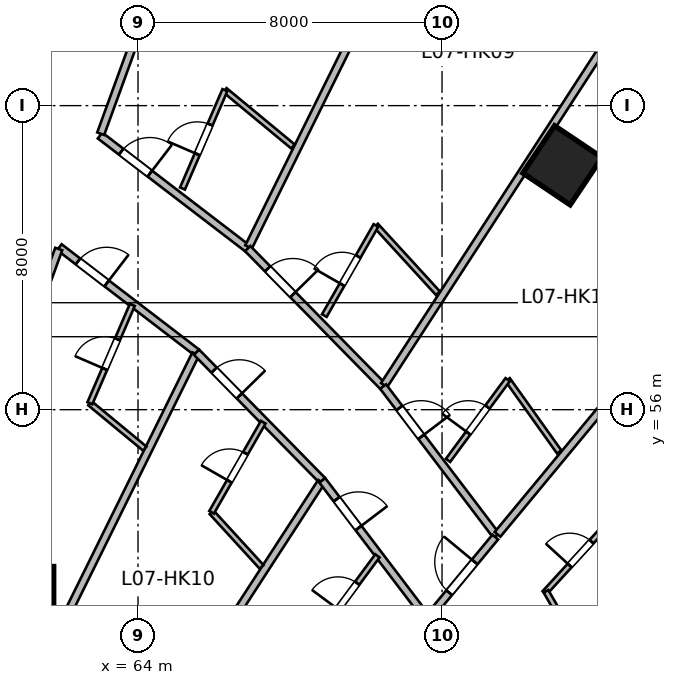
"""IFC4 building model, lengths in metres.
Left out: names, types, materials, properties, quantities, classifications, styles, units other than length and angle.
Written with IfcOpenShell. Run it as: python <this file> out.ifc"""

import sys

from ifc_helpers import new_model, si_unit, direction, frame, frame_2d, origin, origin_2d, place, context, subcontext, project, spatial, rectangle, circle, extrude, source, transform, mapped, element, fill, save


model = new_model("IFC4")
c1 = context("Model", 3, precision=1e-05, world=origin(), true_north=direction((0.0, 1.0)))
c2 = subcontext(c1, "Body", "Model", "MODEL_VIEW")
j1 = project(units=[si_unit("LENGTHUNIT", "METRE"), si_unit("PLANEANGLEUNIT", "RADIAN")], contexts=[c1])
p1 = place(None, origin())
s1 = spatial("IfcSite", under=j1, at=p1, CompositionType="ELEMENT")
p2 = place(p1, origin())
s2 = spatial("IfcBuilding", under=s1, at=p2, CompositionType="ELEMENT")
p3 = place(p2, frame((0.0, 0.0, 39.0)))
s3 = spatial("IfcBuildingStorey", under=s2, at=p3, CompositionType="ELEMENT", Elevation=39.0)
m1 = source(origin(), c2, "Body", "SweptSolid", [
    extrude(circle(Radius=0.7, at=origin_2d()), origin(), (0.0, 0.0, 1.0), 3.6),
])
p4 = place(p3, frame((61.082, 51.175, 0.0), z_axis=(0.0, 0.0, 1.0), x_axis=(0.409126902895, 0.912477494148, 0.0)))
e1 = element("IfcColumn", 1, at=p4, inside=s3, PredefinedType="COLUMN", context=c2, shape_type="MappedRepresentation", body=[
    mapped(m1, transform((0.0, 0.0, 0.0), scale=1.0)),
])
m2 = source(origin(), c2, "Body", "SweptSolid", [
    extrude(rectangle(XDim=1.5, YDim=1.5, at=origin_2d()), origin(), (0.0, 0.0, 1.0), 3.6),
])
p5 = place(p3, frame((75.167, 62.43, 0.0), z_axis=(0.0, 0.0, 1.0), x_axis=(0.55774510898, 0.830012285095, 0.0)))
e2 = element("IfcColumn", 2, at=p5, inside=s3, PredefinedType="COLUMN", context=c2, shape_type="MappedRepresentation", body=[
    mapped(m2, transform((0.0, 0.0, 0.0), scale=1.0)),
])
m3 = source(origin(), c2, "Body", "SweptSolid", [
    extrude(rectangle(XDim=4.895, YDim=0.195, at=frame_2d((2.447, 0.0))), origin(), (0.0, 0.0, 1.0), 3.36),
])
p6 = place(p3, frame((63.001, 63.214, 0.0), z_axis=(0.0, 0.0, 1.0), x_axis=(0.793896075849, -0.608053468661, 0.0)))
e3 = element("IfcWall", 3, at=p6, inside=s3, PredefinedType="PARTITIONING", context=c2, shape_type="MappedRepresentation", body=[
    mapped(m3, transform((0.0, 0.0, 0.0), scale=1.0)),
])
p7 = place(p6, frame((0.7, 0.0, 0.0)))
e4 = element("IfcOpeningElement", 4, at=p7, cuts=e3, PredefinedType="OPENING", context=c2, shape_type="SweptSolid", body=[
    extrude(rectangle(XDim=0.95, YDim=2.15, at=frame_2d((0.475, 1.075))), frame((0.0, 0.107, 0.0), z_axis=(0.0, -1.0, 0.0), x_axis=(1.0, 0.0, 0.0)), (0.0, 0.0, 1.0), 0.215),
])
m4 = source(origin(), c2, "Body", "SweptSolid", [
    extrude(rectangle(XDim=12.088, YDim=0.195, at=frame_2d((6.044, 0.0))), origin(), (0.0, 0.0, 1.0), 3.36),
])
p8 = place(p3, frame((63.019, 63.262, 0.0), z_axis=(0.0, 0.0, 1.0), x_axis=(0.34203007529, 0.939689005787, 0.0)))
e5 = element("IfcWall", 5, at=p8, inside=s3, PredefinedType="PARTITIONING", context=c2, shape_type="MappedRepresentation", body=[
    mapped(m4, transform((0.0, 0.0, 0.0), scale=1.0)),
])
m5 = source(origin(), c2, "Body", "SweptSolid", [
    extrude(rectangle(XDim=11.77, YDim=0.195, at=frame_2d((5.885, 0.0))), origin(), (0.0, 0.0, 1.0), 3.36),
])
p9 = place(p3, frame((66.909, 60.282, 0.0), z_axis=(0.0, 0.0, 1.0), x_axis=(0.44286060326, 0.896590478468, 0.0)))
e6 = element("IfcWall", 6, at=p9, inside=s3, PredefinedType="PARTITIONING", context=c2, shape_type="MappedRepresentation", body=[
    mapped(m5, transform((0.0, 0.0, 0.0), scale=1.0)),
])
m6 = source(origin(), c2, "Body", "SweptSolid", [
    extrude(rectangle(XDim=2.324, YDim=0.14, at=frame_2d((1.162, 0.0))), origin(), (0.0, 0.0, 1.0), 3.36),
])
p10 = place(p3, frame((66.286, 64.407, 0.0), z_axis=(0.0, 0.0, 1.0), x_axis=(0.770746444956, -0.637141991701, 0.0)))
e7 = element("IfcWall", 7, at=p10, inside=s3, PredefinedType="PARTITIONING", context=c2, shape_type="MappedRepresentation", body=[
    mapped(m6, transform((0.0, 0.0, 0.0), scale=1.0)),
])
m7 = source(origin(), c2, "Body", "SweptSolid", [
    extrude(rectangle(XDim=2.818, YDim=0.14, at=frame_2d((1.409, 0.0))), origin(), (0.0, 0.0, 1.0), 3.36),
])
p11 = place(p3, frame((65.17, 61.819, 0.0), z_axis=(0.0, 0.0, 1.0), x_axis=(0.395894859341, 0.918295845764, 0.0)))
e8 = element("IfcWall", 8, at=p11, inside=s3, PredefinedType="PARTITIONING", context=c2, shape_type="MappedRepresentation", body=[
    mapped(m7, transform((0.0, 0.0, 0.0), scale=1.0)),
])
p12 = place(p11, frame((0.984, 0.0, 0.0)))
e9 = element("IfcOpeningElement", 9, at=p12, cuts=e8, PredefinedType="OPENING", context=c2, shape_type="SweptSolid", body=[
    extrude(rectangle(XDim=0.85, YDim=2.05, at=frame_2d((0.425, 1.025))), frame((0.0, 0.08, 0.0), z_axis=(0.0, -1.0, 0.0), x_axis=(1.0, 0.0, 0.0)), (0.0, 0.0, 1.0), 0.16),
])
m8 = source(origin(), c2, "Body", "SweptSolid", [
    extrude(rectangle(XDim=4.546, YDim=0.195, at=frame_2d((2.273, 0.0))), origin(), (0.0, 0.0, 1.0), 3.36),
])
p13 = place(p3, frame((61.931, 60.275, 0.0), z_axis=(0.0, 0.0, 1.0), x_axis=(0.793907931297, -0.608037989457, 0.0)))
e10 = element("IfcWall", 10, at=p13, inside=s3, PredefinedType="PARTITIONING", context=c2, shape_type="MappedRepresentation", body=[
    mapped(m8, transform((0.0, 0.0, 0.0), scale=1.0)),
])
p14 = place(p13, frame((0.616, 0.0, 0.0)))
e11 = element("IfcOpeningElement", 11, at=p14, cuts=e10, PredefinedType="OPENING", context=c2, shape_type="SweptSolid", body=[
    extrude(rectangle(XDim=0.95, YDim=2.15, at=frame_2d((0.475, 1.075))), frame((0.0, 0.107, 0.0), z_axis=(0.0, -1.0, 0.0), x_axis=(1.0, 0.0, 0.0)), (0.0, 0.0, 1.0), 0.215),
])
m9 = source(origin(), c2, "Body", "SweptSolid", [
    extrude(rectangle(XDim=12.196, YDim=0.195, at=frame_2d((6.098, 0.0))), origin(), (0.0, 0.0, 1.0), 3.36),
])
p15 = place(p3, frame((57.742, 48.766, 0.0), z_axis=(0.0, 0.0, 1.0), x_axis=(0.342022711534, 0.939691686031, 0.0)))
e12 = element("IfcWall", 12, at=p15, inside=s3, PredefinedType="PARTITIONING", context=c2, shape_type="MappedRepresentation", body=[
    mapped(m9, transform((0.0, 0.0, 0.0), scale=1.0)),
])
m10 = source(origin(), c2, "Body", "SweptSolid", [
    extrude(rectangle(XDim=11.844, YDim=0.195, at=frame_2d((5.922, 0.0))), origin(), (0.0, 0.0, 1.0), 3.36),
])
p16 = place(p3, frame((60.273, 46.848, 0.0), z_axis=(0.0, 0.0, 1.0), x_axis=(0.442871152218, 0.896585267854, 0.0)))
e13 = element("IfcWall", 13, at=p16, inside=s3, PredefinedType="PARTITIONING", context=c2, shape_type="MappedRepresentation", body=[
    mapped(m10, transform((0.0, 0.0, 0.0), scale=1.0)),
])
m11 = source(origin(), c2, "Body", "SweptSolid", [
    extrude(rectangle(XDim=1.873, YDim=0.14, at=frame_2d((0.937, 0.0))), origin(), (0.0, 0.0, 1.0), 3.36),
])
p17 = place(p3, frame((62.734, 56.169, 0.0), z_axis=(0.0, 0.0, 1.0), x_axis=(0.77069451688, -0.637204803537, 0.0)))
e14 = element("IfcWall", 14, at=p17, inside=s3, PredefinedType="PARTITIONING", context=c2, shape_type="MappedRepresentation", body=[
    mapped(m11, transform((0.0, 0.0, 0.0), scale=1.0)),
])
m12 = source(origin(), c2, "Body", "SweptSolid", [
    extrude(rectangle(XDim=2.817, YDim=0.14, at=frame_2d((1.409, 0.0))), origin(), (0.0, 0.0, 1.0), 3.36),
])
p18 = place(p3, frame((62.734, 56.169, 0.0), z_axis=(0.0, 0.0, 1.0), x_axis=(0.395999429727, 0.918250756415, 0.0)))
e15 = element("IfcWall", 15, at=p18, inside=s3, PredefinedType="PARTITIONING", context=c2, shape_type="MappedRepresentation", body=[
    mapped(m12, transform((0.0, 0.0, 0.0), scale=1.0)),
])
p19 = place(p18, frame((0.984, 0.0, 0.0)))
e16 = element("IfcOpeningElement", 16, at=p19, cuts=e15, PredefinedType="OPENING", context=c2, shape_type="SweptSolid", body=[
    extrude(rectangle(XDim=0.85, YDim=2.05, at=frame_2d((0.425, 1.025))), frame((0.0, 0.08, 0.0), z_axis=(0.0, -1.0, 0.0), x_axis=(1.0, 0.0, 0.0)), (0.0, 0.0, 1.0), 0.16),
])
m13 = source(origin(), c2, "Body", "SweptSolid", [
    extrude(rectangle(XDim=5.087, YDim=0.195, at=frame_2d((2.543, 0.0))), origin(), (0.0, 0.0, 1.0), 3.36),
])
p20 = place(p3, frame((66.887, 60.238, 0.0), z_axis=(0.0, 0.0, 1.0), x_axis=(0.700428330775, -0.7137227427, 0.0)))
e17 = element("IfcWall", 17, at=p20, inside=s3, PredefinedType="PARTITIONING", context=c2, shape_type="MappedRepresentation", body=[
    mapped(m13, transform((0.0, 0.0, 0.0), scale=1.0)),
])
p21 = place(p20, frame((0.746, 0.0, 0.0)))
e18 = element("IfcOpeningElement", 18, at=p21, cuts=e17, PredefinedType="OPENING", context=c2, shape_type="SweptSolid", body=[
    extrude(rectangle(XDim=0.95, YDim=2.15, at=frame_2d((0.475, 1.075))), frame((0.0, 0.107, 0.0), z_axis=(0.0, -1.0, 0.0), x_axis=(1.0, 0.0, 0.0)), (0.0, 0.0, 1.0), 0.215),
])
m14 = source(origin(), c2, "Body", "SweptSolid", [
    extrude(rectangle(XDim=11.403, YDim=0.195, at=frame_2d((5.701, 0.0))), origin(), (0.0, 0.0, 1.0), 3.36),
])
p22 = place(p3, frame((70.477, 56.647, 0.0), z_axis=(0.0, 0.0, 1.0), x_axis=(0.544246090008, 0.838925618581, 0.0)))
e19 = element("IfcWall", 19, at=p22, inside=s3, PredefinedType="PARTITIONING", context=c2, shape_type="MappedRepresentation", body=[
    mapped(m14, transform((0.0, 0.0, 0.0), scale=1.0)),
])
m15 = source(origin(), c2, "Body", "SweptSolid", [
    extrude(rectangle(XDim=2.416, YDim=0.14, at=frame_2d((1.208, 0.0))), origin(), (0.0, 0.0, 1.0), 3.36),
])
p23 = place(p3, frame((70.26, 60.846, 0.0), z_axis=(0.0, 0.0, 1.0), x_axis=(0.675399637907, -0.737451916476, 0.0)))
e20 = element("IfcWall", 20, at=p23, inside=s3, PredefinedType="PARTITIONING", context=c2, shape_type="MappedRepresentation", body=[
    mapped(m15, transform((0.0, 0.0, 0.0), scale=1.0)),
])
m16 = source(origin(), c2, "Body", "SweptSolid", [
    extrude(rectangle(XDim=2.732, YDim=0.14, at=frame_2d((1.366, 0.0))), origin(), (0.0, 0.0, 1.0), 3.36),
])
p24 = place(p3, frame((68.902, 58.476, 0.0), z_axis=(0.0, 0.0, 1.0), x_axis=(0.497254966372, 0.867604459658, 0.0)))
e21 = element("IfcWall", 21, at=p24, inside=s3, PredefinedType="PARTITIONING", context=c2, shape_type="MappedRepresentation", body=[
    mapped(m16, transform((0.0, 0.0, 0.0), scale=1.0)),
])
p25 = place(p24, frame((0.941, 0.0, 0.0)))
e22 = element("IfcOpeningElement", 22, at=p25, cuts=e21, PredefinedType="OPENING", context=c2, shape_type="SweptSolid", body=[
    extrude(rectangle(XDim=0.85, YDim=2.05, at=frame_2d((0.425, 1.025))), frame((0.0, 0.08, 0.0), z_axis=(0.0, -1.0, 0.0), x_axis=(1.0, 0.0, 0.0)), (0.0, 0.0, 1.0), 0.16),
])
m17 = source(origin(), c2, "Body", "SweptSolid", [
    extrude(rectangle(XDim=4.724, YDim=0.195, at=frame_2d((2.362, 0.0))), origin(), (0.0, 0.0, 1.0), 3.36),
])
p26 = place(p3, frame((65.541, 57.511, 0.0), z_axis=(0.0, 0.0, 1.0), x_axis=(0.700435057457, -0.713716141253, 0.0)))
e23 = element("IfcWall", 23, at=p26, inside=s3, PredefinedType="PARTITIONING", context=c2, shape_type="MappedRepresentation", body=[
    mapped(m17, transform((0.0, 0.0, 0.0), scale=1.0)),
])
p27 = place(p26, frame((0.659, 0.0, 0.0)))
e24 = element("IfcOpeningElement", 24, at=p27, cuts=e23, PredefinedType="OPENING", context=c2, shape_type="SweptSolid", body=[
    extrude(rectangle(XDim=0.95, YDim=2.15, at=frame_2d((0.475, 1.075))), frame((0.0, 0.107, 0.0), z_axis=(0.0, -1.0, 0.0), x_axis=(1.0, 0.0, 0.0)), (0.0, 0.0, 1.0), 0.215),
])
m18 = source(origin(), c2, "Body", "SweptSolid", [
    extrude(rectangle(XDim=11.429, YDim=0.195, at=frame_2d((5.714, 0.0))), origin(), (0.0, 0.0, 1.0), 3.36),
])
p28 = place(p3, frame((62.604, 44.511, 0.0), z_axis=(0.0, 0.0, 1.0), x_axis=(0.544215487077, 0.838945471187, 0.0)))
e25 = element("IfcWall", 25, at=p28, inside=s3, PredefinedType="PARTITIONING", context=c2, shape_type="MappedRepresentation", body=[
    mapped(m18, transform((0.0, 0.0, 0.0), scale=1.0)),
])
m19 = source(origin(), c2, "Body", "SweptSolid", [
    extrude(rectangle(XDim=1.947, YDim=0.14, at=frame_2d((0.973, 0.0))), origin(), (0.0, 0.0, 1.0), 2.803),
])
p29 = place(p3, frame((65.936, 53.3, 0.0), z_axis=(0.0, 0.0, 1.0), x_axis=(0.675383794012, -0.737466426888, 0.0)))
e26 = element("IfcWall", 26, at=p29, inside=s3, PredefinedType="PARTITIONING", context=c2, shape_type="MappedRepresentation", body=[
    mapped(m19, transform((0.0, 0.0, 0.0), scale=1.0)),
])
m20 = source(origin(), c2, "Body", "SweptSolid", [
    extrude(rectangle(XDim=2.731, YDim=0.14, at=frame_2d((1.366, 0.0))), origin(), (0.0, 0.0, 1.0), 3.36),
])
p30 = place(p3, frame((65.936, 53.3, 0.0), z_axis=(0.0, 0.0, 1.0), x_axis=(0.497120404056, 0.867681568244, 0.0)))
e27 = element("IfcWall", 27, at=p30, inside=s3, PredefinedType="PARTITIONING", context=c2, shape_type="MappedRepresentation", body=[
    mapped(m20, transform((0.0, 0.0, 0.0), scale=1.0)),
])
p31 = place(p30, frame((0.941, 0.0, 0.0)))
e28 = element("IfcOpeningElement", 28, at=p31, cuts=e27, PredefinedType="OPENING", context=c2, shape_type="SweptSolid", body=[
    extrude(rectangle(XDim=0.85, YDim=2.05, at=frame_2d((0.425, 1.025))), frame((0.0, 0.08, 0.0), z_axis=(0.0, -1.0, 0.0), x_axis=(1.0, 0.0, 0.0)), (0.0, 0.0, 1.0), 0.16),
])
m21 = source(origin(), c2, "Body", "SweptSolid", [
    extrude(rectangle(XDim=4.928, YDim=0.195, at=frame_2d((2.464, 0.0))), origin(), (0.0, 0.0, 1.0), 3.36),
])
p32 = place(p3, frame((70.45, 56.607, 0.0), z_axis=(0.0, 0.0, 1.0), x_axis=(0.604793043708, -0.796382680803, 0.0)))
e29 = element("IfcWall", 29, at=p32, inside=s3, PredefinedType="PARTITIONING", context=c2, shape_type="MappedRepresentation", body=[
    mapped(m21, transform((0.0, 0.0, 0.0), scale=1.0)),
])
p33 = place(p32, frame((0.708, 0.0, 0.0)))
e30 = element("IfcOpeningElement", 30, at=p33, cuts=e29, PredefinedType="OPENING", context=c2, shape_type="SweptSolid", body=[
    extrude(rectangle(XDim=0.95, YDim=2.15, at=frame_2d((0.475, 1.075))), frame((0.0, 0.107, 0.0), z_axis=(0.0, -1.0, 0.0), x_axis=(1.0, 0.0, 0.0)), (0.0, 0.0, 1.0), 0.215),
])
m22 = source(origin(), c2, "Body", "SweptSolid", [
    extrude(rectangle(XDim=10.975, YDim=0.195, at=frame_2d((5.487, 0.0))), origin(), (0.0, 0.0, 1.0), 3.36),
])
p34 = place(p3, frame((73.46, 52.719, 0.0), z_axis=(0.0, 0.0, 1.0), x_axis=(0.638125265812, 0.769932558821, 0.0)))
e31 = element("IfcWall", 31, at=p34, inside=s3, PredefinedType="PARTITIONING", context=c2, shape_type="MappedRepresentation", body=[
    mapped(m22, transform((0.0, 0.0, 0.0), scale=1.0)),
])
m23 = source(origin(), c2, "Body", "SweptSolid", [
    extrude(rectangle(XDim=2.337, YDim=0.14, at=frame_2d((1.169, 0.0))), origin(), (0.0, 0.0, 1.0), 3.36),
])
p35 = place(p3, frame((73.727, 56.789, 0.0), z_axis=(0.0, 0.0, 1.0), x_axis=(0.580862665959, -0.814001574504, 0.0)))
e32 = element("IfcWall", 32, at=p35, inside=s3, PredefinedType="PARTITIONING", context=c2, shape_type="MappedRepresentation", body=[
    mapped(m23, transform((0.0, 0.0, 0.0), scale=1.0)),
])
m24 = source(origin(), c2, "Body", "SweptSolid", [
    extrude(rectangle(XDim=2.64, YDim=0.14, at=frame_2d((1.32, 0.0))), origin(), (0.0, 0.0, 1.0), 3.36),
])
p36 = place(p3, frame((72.157, 54.666, 0.0), z_axis=(0.0, 0.0, 1.0), x_axis=(0.594630255283, 0.803999290735, 0.0)))
e33 = element("IfcWall", 33, at=p36, inside=s3, PredefinedType="PARTITIONING", context=c2, shape_type="MappedRepresentation", body=[
    mapped(m24, transform((0.0, 0.0, 0.0), scale=1.0)),
])
p37 = place(p36, frame((0.895, 0.0, 0.0)))
e34 = element("IfcOpeningElement", 34, at=p37, cuts=e33, PredefinedType="OPENING", context=c2, shape_type="SweptSolid", body=[
    extrude(rectangle(XDim=0.85, YDim=2.05, at=frame_2d((0.425, 1.025))), frame((0.0, 0.08, 0.0), z_axis=(0.0, -1.0, 0.0), x_axis=(1.0, 0.0, 0.0)), (0.0, 0.0, 1.0), 0.16),
])
m25 = source(origin(), c2, "Body", "SweptSolid", [
    extrude(rectangle(XDim=4.576, YDim=0.195, at=frame_2d((2.288, 0.0))), origin(), (0.0, 0.0, 1.0), 3.36),
])
p38 = place(p3, frame((68.85, 54.139, 0.0), z_axis=(0.0, 0.0, 1.0), x_axis=(0.604795096156, -0.796381122118, 0.0)))
e35 = element("IfcWall", 35, at=p38, inside=s3, PredefinedType="PARTITIONING", context=c2, shape_type="MappedRepresentation", body=[
    mapped(m25, transform((0.0, 0.0, 0.0), scale=1.0)),
])
p39 = place(p38, frame((0.623, 0.0, 0.0)))
e36 = element("IfcOpeningElement", 36, at=p39, cuts=e35, PredefinedType="OPENING", context=c2, shape_type="SweptSolid", body=[
    extrude(rectangle(XDim=0.95, YDim=2.15, at=frame_2d((0.475, 1.075))), frame((0.0, 0.107, 0.0), z_axis=(0.0, -1.0, 0.0), x_axis=(1.0, 0.0, 0.0)), (0.0, 0.0, 1.0), 0.215),
])
p40 = place(p3, frame((68.729, 50.031, 0.0), z_axis=(0.0, 0.0, 1.0), x_axis=(0.594674469522, 0.803966588422, 0.0)))
e37 = element("IfcWall", 37, at=p40, inside=s3, PredefinedType="PARTITIONING", context=c2, shape_type="MappedRepresentation", body=[
    mapped(m24, transform((0.0, 0.0, 0.0), scale=1.0)),
])
p41 = place(p40, frame((0.895, 0.0, 0.0)))
e38 = element("IfcOpeningElement", 38, at=p41, cuts=e37, PredefinedType="OPENING", context=c2, shape_type="SweptSolid", body=[
    extrude(rectangle(XDim=0.85, YDim=2.05, at=frame_2d((0.425, 1.025))), frame((0.0, 0.08, 0.0), z_axis=(0.0, -1.0, 0.0), x_axis=(1.0, 0.0, 0.0)), (0.0, 0.0, 1.0), 0.16),
])
m26 = source(origin(), c2, "Body", "SweptSolid", [
    extrude(rectangle(XDim=2.748, YDim=0.195, at=frame_2d((1.374, 0.0))), origin(), (0.0, 0.0, 1.0), 3.36),
])
p42 = place(p3, frame((71.647, 50.531, 0.0), z_axis=(0.0, 0.0, 1.0), x_axis=(0.638111168284, 0.769944242729, 0.0)))
e39 = element("IfcWall", 39, at=p42, inside=s3, PredefinedType="PARTITIONING", context=c2, shape_type="MappedRepresentation", body=[
    mapped(m26, transform((0.0, 0.0, 0.0), scale=1.0)),
])
p43 = place(p42, frame((0.849, 0.0, 0.0)))
e40 = element("IfcOpeningElement", 40, at=p43, cuts=e39, PredefinedType="OPENING", context=c2, shape_type="SweptSolid", body=[
    extrude(rectangle(XDim=1.05, YDim=2.15, at=frame_2d((0.525, 1.075))), frame((0.0, 0.107, 0.0), z_axis=(0.0, -1.0, 0.0), x_axis=(1.0, 0.0, 0.0)), (0.0, 0.0, 1.0), 0.215),
])
m27 = source(origin(), c2, "Body", "SweptSolid", [
    extrude(rectangle(XDim=2.812, YDim=0.14, at=frame_2d((1.406, 0.0))), origin(), (0.0, 0.0, 1.0), 3.36),
])
p44 = place(p3, frame((74.697, 51.177, 0.0), z_axis=(0.0, 0.0, 1.0), x_axis=(0.675119025852, 0.737708818527, 0.0)))
e41 = element("IfcWall", 41, at=p44, inside=s3, PredefinedType="PARTITIONING", context=c2, shape_type="MappedRepresentation", body=[
    mapped(m27, transform((0.0, 0.0, 0.0), scale=1.0)),
])
p45 = place(p44, frame((0.981, 0.0, 0.0)))
e42 = element("IfcOpeningElement", 42, at=p45, cuts=e41, PredefinedType="OPENING", context=c2, shape_type="SweptSolid", body=[
    extrude(rectangle(XDim=0.85, YDim=2.05, at=frame_2d((0.425, 1.025))), frame((0.0, 0.08, 0.0), z_axis=(0.0, -1.0, 0.0), x_axis=(1.0, 0.0, 0.0)), (0.0, 0.0, 1.0), 0.16),
])
m28 = source(origin(), c2, "Body", "SweptSolid", [
    extrude(rectangle(XDim=1.914, YDim=0.14, at=frame_2d((0.957, 0.0))), origin(), (0.0, 0.0, 1.0), 3.36),
])
p46 = place(p3, frame((74.736, 51.219, 0.0), z_axis=(0.0, 0.0, 1.0), x_axis=(0.502347790612, -0.864665656347, 0.0)))
e43 = element("IfcWall", 43, at=p46, inside=s3, PredefinedType="PARTITIONING", context=c2, shape_type="MappedRepresentation", body=[
    mapped(m28, transform((0.0, 0.0, 0.0), scale=1.0)),
])
m29 = source(origin(), c2, "Body", "SweptSolid", [
    extrude(rectangle(XDim=0.95, YDim=2.15, at=frame_2d((0.475, 1.075))), frame((0.0, 0.025, 0.0), z_axis=(0.0, -1.0, 0.0), x_axis=(1.0, 0.0, 0.0)), (0.0, 0.0, 1.0), 0.05),
])
p47 = place(p7, origin())
e44 = element("IfcDoor", 44, at=p47, inside=s3, OperationType="SINGLE_SWING_RIGHT", PredefinedType="DOOR", context=c2, shape_type="MappedRepresentation", body=[
    mapped(m29, transform((0.0, 0.0, 0.0), scale=1.0)),
])
fill(e4, e44)
m30 = source(origin(), c2, "Body", "SweptSolid", [
    extrude(rectangle(XDim=0.85, YDim=2.05, at=frame_2d((0.425, 1.025))), frame((0.0, 0.025, 0.0), z_axis=(0.0, -1.0, 0.0), x_axis=(1.0, 0.0, 0.0)), (0.0, 0.0, 1.0), 0.05),
])
p48 = place(p12, origin())
e45 = element("IfcDoor", 45, at=p48, inside=s3, OperationType="SINGLE_SWING_LEFT", PredefinedType="DOOR", context=c2, shape_type="MappedRepresentation", body=[
    mapped(m30, transform((0.0, 0.0, 0.0), scale=1.0)),
])
fill(e9, e45)
p49 = place(p14, origin())
e46 = element("IfcDoor", 46, at=p49, inside=s3, OperationType="SINGLE_SWING_RIGHT", PredefinedType="DOOR", context=c2, shape_type="MappedRepresentation", body=[
    mapped(m29, transform((0.0, 0.0, 0.0), scale=1.0)),
])
fill(e11, e46)
p50 = place(p19, origin())
e47 = element("IfcDoor", 47, at=p50, inside=s3, OperationType="SINGLE_SWING_LEFT", PredefinedType="DOOR", context=c2, shape_type="MappedRepresentation", body=[
    mapped(m30, transform((0.0, 0.0, 0.0), scale=1.0)),
])
fill(e16, e47)
p51 = place(p21, origin())
e48 = element("IfcDoor", 48, at=p51, inside=s3, OperationType="SINGLE_SWING_RIGHT", PredefinedType="DOOR", context=c2, shape_type="MappedRepresentation", body=[
    mapped(m29, transform((0.0, 0.0, 0.0), scale=1.0)),
])
fill(e18, e48)
p52 = place(p25, origin())
e49 = element("IfcDoor", 49, at=p52, inside=s3, OperationType="SINGLE_SWING_LEFT", PredefinedType="DOOR", context=c2, shape_type="MappedRepresentation", body=[
    mapped(m30, transform((0.0, 0.0, 0.0), scale=1.0)),
])
fill(e22, e49)
p53 = place(p27, origin())
e50 = element("IfcDoor", 50, at=p53, inside=s3, OperationType="SINGLE_SWING_RIGHT", PredefinedType="DOOR", context=c2, shape_type="MappedRepresentation", body=[
    mapped(m29, transform((0.0, 0.0, 0.0), scale=1.0)),
])
fill(e24, e50)
p54 = place(p31, origin())
e51 = element("IfcDoor", 51, at=p54, inside=s3, OperationType="SINGLE_SWING_LEFT", PredefinedType="DOOR", context=c2, shape_type="MappedRepresentation", body=[
    mapped(m30, transform((0.0, 0.0, 0.0), scale=1.0)),
])
fill(e28, e51)
p55 = place(p33, origin())
e52 = element("IfcDoor", 52, at=p55, inside=s3, OperationType="SINGLE_SWING_RIGHT", PredefinedType="DOOR", context=c2, shape_type="MappedRepresentation", body=[
    mapped(m29, transform((0.0, 0.0, 0.0), scale=1.0)),
])
fill(e30, e52)
p56 = place(p37, origin())
e53 = element("IfcDoor", 53, at=p56, inside=s3, OperationType="SINGLE_SWING_LEFT", PredefinedType="DOOR", context=c2, shape_type="MappedRepresentation", body=[
    mapped(m30, transform((0.0, 0.0, 0.0), scale=1.0)),
])
fill(e34, e53)
p57 = place(p39, origin())
e54 = element("IfcDoor", 54, at=p57, inside=s3, OperationType="SINGLE_SWING_RIGHT", PredefinedType="DOOR", context=c2, shape_type="MappedRepresentation", body=[
    mapped(m29, transform((0.0, 0.0, 0.0), scale=1.0)),
])
fill(e36, e54)
p58 = place(p41, origin())
e55 = element("IfcDoor", 55, at=p58, inside=s3, OperationType="SINGLE_SWING_LEFT", PredefinedType="DOOR", context=c2, shape_type="MappedRepresentation", body=[
    mapped(m30, transform((0.0, 0.0, 0.0), scale=1.0)),
])
fill(e38, e55)
m31 = source(origin(), c2, "Body", "SweptSolid", [
    extrude(rectangle(XDim=1.05, YDim=2.15, at=frame_2d((0.525, 1.075))), frame((0.0, 0.025, 0.0), z_axis=(0.0, -1.0, 0.0), x_axis=(1.0, 0.0, 0.0)), (0.0, 0.0, 1.0), 0.05),
])
p59 = place(p43, origin())
e56 = element("IfcDoor", 56, at=p59, inside=s3, OperationType="SINGLE_SWING_RIGHT", PredefinedType="DOOR", context=c2, shape_type="MappedRepresentation", body=[
    mapped(m31, transform((0.0, 0.0, 0.0), scale=1.0)),
])
fill(e40, e56)
p60 = place(p45, origin())
e57 = element("IfcDoor", 57, at=p60, inside=s3, OperationType="SINGLE_SWING_LEFT", PredefinedType="DOOR", context=c2, shape_type="MappedRepresentation", body=[
    mapped(m30, transform((0.0, 0.0, 0.0), scale=1.0)),
])
fill(e42, e57)
save(model, sys.argv[1])
